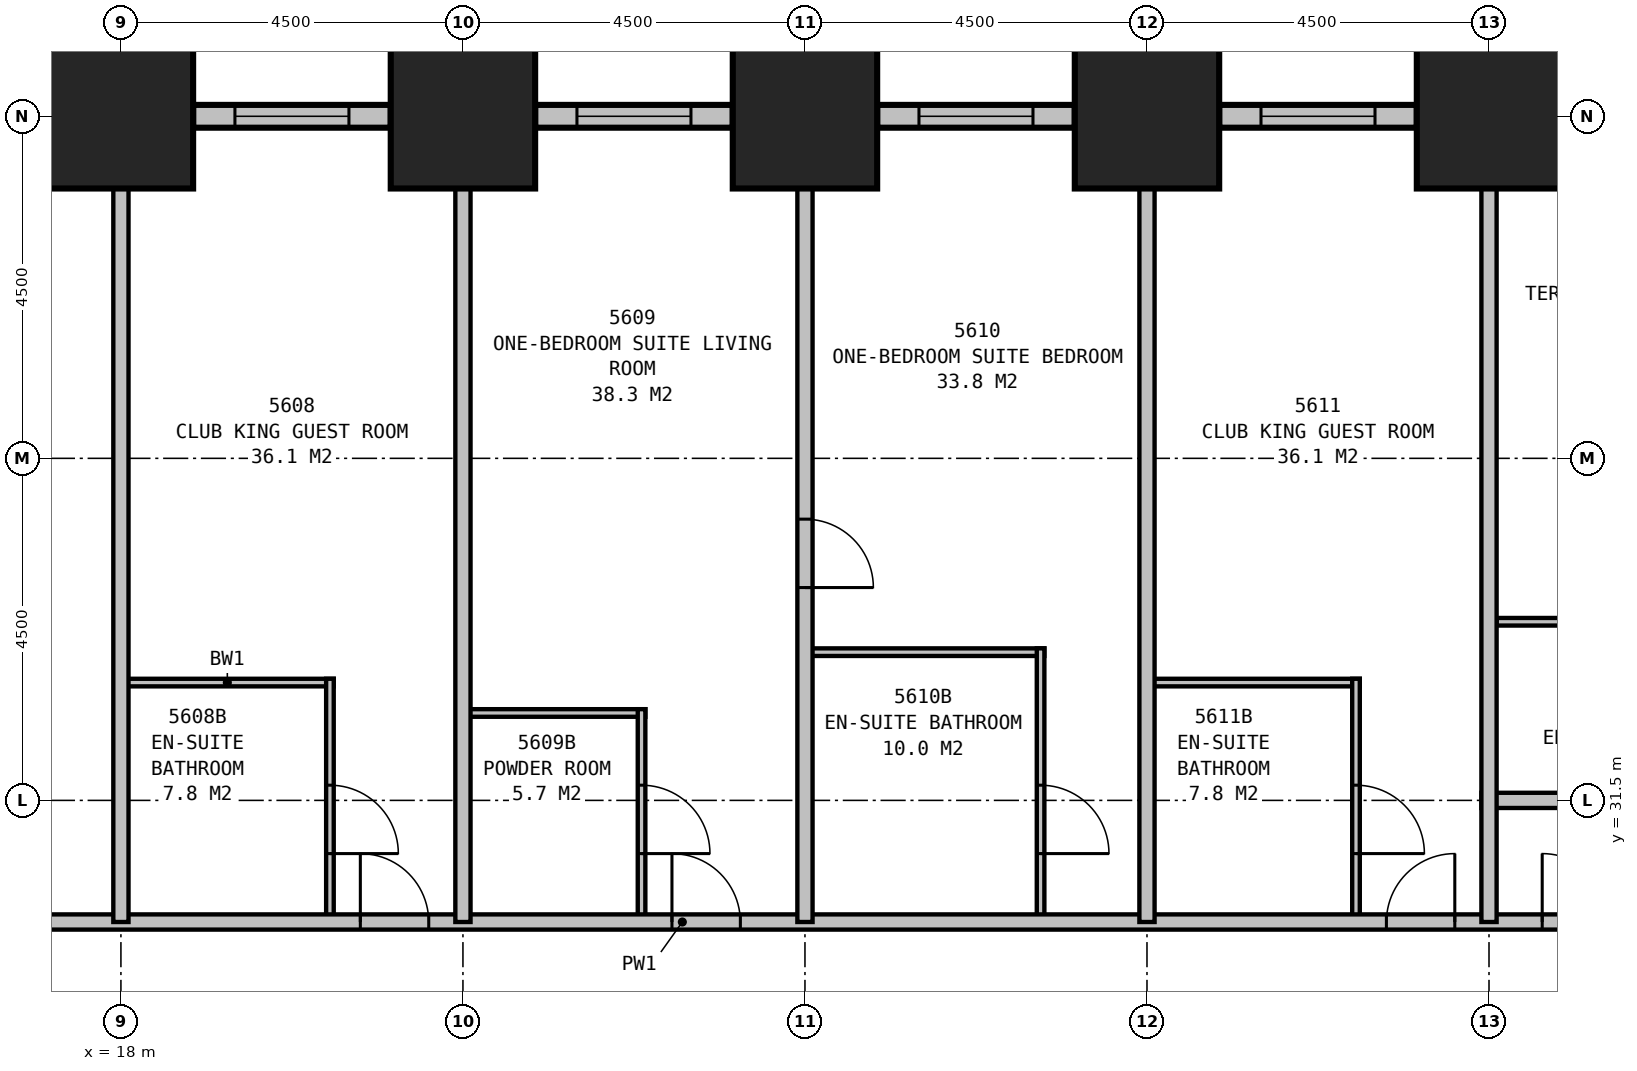
"""IFC4 building model, lengths in metres.
Left out: names, types, materials, properties, quantities, classifications, styles, units other than length and angle.
Written with IfcOpenShell. Run it as: python <this file> out.ifc"""

import sys

from ifc_helpers import new_model, si_unit, direction, frame, frame_2d, origin, origin_2d, place, context, subcontext, project, spatial, rectangle, extrude, element, fill, save


model = new_model("IFC4")
c1 = context("Model", 3, precision=1e-05, world=origin(), true_north=direction((0.0, 1.0)))
c2 = subcontext(c1, "Body", "Model", "MODEL_VIEW")
j1 = project(units=[si_unit("LENGTHUNIT", "METRE"), si_unit("PLANEANGLEUNIT", "RADIAN")], contexts=[c1])
p1 = place(None, origin())
s1 = spatial("IfcSite", under=j1, at=p1, CompositionType="ELEMENT")
p2 = place(p1, origin())
s2 = spatial("IfcBuilding", under=s1, at=p2, CompositionType="ELEMENT")
p3 = place(p2, frame((0.0, 0.0, 217.4)))
s3 = spatial("IfcBuildingStorey", under=s2, at=p3, CompositionType="ELEMENT", Elevation=217.4)
for number, where, z_axis, x_axis in (
    (1, (36.0, 40.5, 0.0), (0.0, 0.0, 1.0), (1.0, 0.0, 0.0)),
    (2, (31.5, 40.5, 0.0), (0.0, 0.0, 1.0), (1.0, 0.0, 0.0)),
    (3, (27.0, 40.5, 0.0), (0.0, 0.0, 1.0), (1.0, 0.0, 0.0)),
    (4, (22.5, 40.5, 0.0), (0.0, 0.0, 1.0), (1.0, 0.0, 0.0)),
    (5, (18.0, 40.5, 0.0), (0.0, 0.0, 1.0), (1.0, 0.0, 0.0)),
):
    element("IfcColumn", number, at=place(p3, frame(where, z_axis=z_axis, x_axis=x_axis)), inside=s3, PredefinedType="COLUMN", context=c2, shape_type="SweptSolid", body=[
        extrude(rectangle(XDim=1.9, YDim=1.9, at=origin_2d()), origin(), (0.0, 0.0, 1.0), 3.9),
    ])
p4 = place(p3, frame((35.05, 40.5, 0.0), z_axis=(0.0, 0.0, 1.0), x_axis=(-1.0, 0.0, 0.0)))
e6 = element("IfcWall", 6, at=p4, inside=s3, PredefinedType="STANDARD", context=c2, shape_type="SweptSolid", body=[
    extrude(rectangle(XDim=2.6, YDim=0.3, at=frame_2d((1.3, 0.0))), origin(), (0.0, 0.0, 1.0), 2.15),
])
p5 = place(p4, frame((0.55, 0.0, 0.5)))
e7 = element("IfcOpeningElement", 7, at=p5, cuts=e6, PredefinedType="OPENING", context=c2, shape_type="SweptSolid", body=[
    extrude(rectangle(XDim=1.5, YDim=1.5, at=frame_2d((0.75, 0.75))), frame((0.0, 0.16, 0.0), z_axis=(0.0, -1.0, 0.0), x_axis=(1.0, 0.0, 0.0)), (0.0, 0.0, 1.0), 0.32),
])
p6 = place(p3, frame((30.55, 40.5, 0.0), z_axis=(0.0, 0.0, 1.0), x_axis=(-1.0, 0.0, 0.0)))
e8 = element("IfcWall", 8, at=p6, inside=s3, PredefinedType="STANDARD", context=c2, shape_type="SweptSolid", body=[
    extrude(rectangle(XDim=2.6, YDim=0.3, at=frame_2d((1.3, 0.0))), origin(), (0.0, 0.0, 1.0), 2.15),
])
p7 = place(p6, frame((0.55, 0.0, 0.5)))
e9 = element("IfcOpeningElement", 9, at=p7, cuts=e8, PredefinedType="OPENING", context=c2, shape_type="SweptSolid", body=[
    extrude(rectangle(XDim=1.5, YDim=1.5, at=frame_2d((0.75, 0.75))), frame((0.0, 0.16, 0.0), z_axis=(0.0, -1.0, 0.0), x_axis=(1.0, 0.0, 0.0)), (0.0, 0.0, 1.0), 0.32),
])
p8 = place(p3, frame((26.05, 40.5, 0.0), z_axis=(0.0, 0.0, 1.0), x_axis=(-1.0, 0.0, 0.0)))
e10 = element("IfcWall", 10, at=p8, inside=s3, PredefinedType="STANDARD", context=c2, shape_type="SweptSolid", body=[
    extrude(rectangle(XDim=2.6, YDim=0.3, at=frame_2d((1.3, 0.0))), origin(), (0.0, 0.0, 1.0), 2.15),
])
p9 = place(p8, frame((0.55, 0.0, 0.5)))
e11 = element("IfcOpeningElement", 11, at=p9, cuts=e10, PredefinedType="OPENING", context=c2, shape_type="SweptSolid", body=[
    extrude(rectangle(XDim=1.5, YDim=1.5, at=frame_2d((0.75, 0.75))), frame((0.0, 0.16, 0.0), z_axis=(0.0, -1.0, 0.0), x_axis=(1.0, 0.0, 0.0)), (0.0, 0.0, 1.0), 0.32),
])
p10 = place(p3, frame((21.55, 40.5, 0.0), z_axis=(0.0, 0.0, 1.0), x_axis=(-1.0, 0.0, 0.0)))
e12 = element("IfcWall", 12, at=p10, inside=s3, PredefinedType="STANDARD", context=c2, shape_type="SweptSolid", body=[
    extrude(rectangle(XDim=2.6, YDim=0.3, at=frame_2d((1.3, 0.0))), origin(), (0.0, 0.0, 1.0), 2.15),
])
p11 = place(p10, frame((0.55, 0.0, 0.5)))
e13 = element("IfcOpeningElement", 13, at=p11, cuts=e12, PredefinedType="OPENING", context=c2, shape_type="SweptSolid", body=[
    extrude(rectangle(XDim=1.5, YDim=1.5, at=frame_2d((0.75, 0.75))), frame((0.0, 0.16, 0.0), z_axis=(0.0, -1.0, 0.0), x_axis=(1.0, 0.0, 0.0)), (0.0, 0.0, 1.0), 0.32),
])
p12 = place(p3, frame((12.473, 29.9, 0.0), z_axis=(0.0, 0.0, 1.0), x_axis=(1.0, 0.0, 0.0)))
e14 = element("IfcWall", 14, at=p12, inside=s3, PredefinedType="PARTITIONING", context=c2, shape_type="SweptSolid", body=[
    extrude(rectangle(XDim=25.827, YDim=0.2, at=frame_2d((12.914, 0.0))), origin(), (0.0, 0.0, 1.0), 3.65),
])
p13 = place(p12, frame((1.25, 0.0, 0.0)))
e15 = element("IfcOpeningElement", 15, at=p13, cuts=e14, PredefinedType="OPENING", context=c2, shape_type="SweptSolid", body=[
    extrude(rectangle(XDim=0.9, YDim=2.1, at=frame_2d((0.45, 1.05))), frame((0.0, 0.11, 0.0), z_axis=(0.0, -1.0, 0.0), x_axis=(1.0, 0.0, 0.0)), (0.0, 0.0, 1.0), 0.22),
])
p14 = place(p12, frame((8.677, 0.0, 0.0)))
e16 = element("IfcOpeningElement", 16, at=p14, cuts=e14, PredefinedType="OPENING", context=c2, shape_type="SweptSolid", body=[
    extrude(rectangle(XDim=0.9, YDim=2.1, at=frame_2d((0.45, 1.05))), frame((0.0, 0.11, 0.0), z_axis=(0.0, -1.0, 0.0), x_axis=(1.0, 0.0, 0.0)), (0.0, 0.0, 1.0), 0.22),
])
p15 = place(p12, frame((12.777, 0.0, 0.0)))
e17 = element("IfcOpeningElement", 17, at=p15, cuts=e14, PredefinedType="OPENING", context=c2, shape_type="SweptSolid", body=[
    extrude(rectangle(XDim=0.9, YDim=2.1, at=frame_2d((0.45, 1.05))), frame((0.0, 0.11, 0.0), z_axis=(0.0, -1.0, 0.0), x_axis=(1.0, 0.0, 0.0)), (0.0, 0.0, 1.0), 0.22),
])
p16 = place(p12, frame((22.177, 0.0, 0.0)))
e18 = element("IfcOpeningElement", 18, at=p16, cuts=e14, PredefinedType="OPENING", context=c2, shape_type="SweptSolid", body=[
    extrude(rectangle(XDim=0.9, YDim=2.1, at=frame_2d((0.45, 1.05))), frame((0.0, 0.11, 0.0), z_axis=(0.0, -1.0, 0.0), x_axis=(1.0, 0.0, 0.0)), (0.0, 0.0, 1.0), 0.22),
])
p17 = place(p12, frame((24.227, 0.0, 0.0)))
e19 = element("IfcOpeningElement", 19, at=p17, cuts=e14, PredefinedType="OPENING", context=c2, shape_type="SweptSolid", body=[
    extrude(rectangle(XDim=0.9, YDim=2.1, at=frame_2d((0.45, 1.05))), frame((0.0, 0.11, 0.0), z_axis=(0.0, -1.0, 0.0), x_axis=(1.0, 0.0, 0.0)), (0.0, 0.0, 1.0), 0.22),
])
for number, where, z_axis, x_axis in (
    (20, (18.0, 29.9, 0.0), (0.0, 0.0, 1.0), (0.0, 1.0, 0.0)),
    (21, (22.5, 29.9, 0.0), (0.0, 0.0, 1.0), (0.0, 1.0, 0.0)),
):
    element("IfcWall", number, at=place(p3, frame(where, z_axis=z_axis, x_axis=x_axis)), inside=s3, PredefinedType="PARTITIONING", context=c2, shape_type="SweptSolid", body=[
        extrude(rectangle(XDim=10.6, YDim=0.2, at=frame_2d((5.3, 0.0))), origin(), (0.0, 0.0, 1.0), 2.65),
    ])
p18 = place(p3, frame((27.0, 29.9, 0.0), z_axis=(0.0, 0.0, 1.0), x_axis=(0.0, 1.0, 0.0)))
e22 = element("IfcWall", 22, at=p18, inside=s3, PredefinedType="PARTITIONING", context=c2, shape_type="SweptSolid", body=[
    extrude(rectangle(XDim=10.6, YDim=0.2, at=frame_2d((5.3, 0.0))), origin(), (0.0, 0.0, 1.0), 2.65),
])
p19 = place(p18, frame((5.3, 0.0, 0.0), z_axis=(0.0, 0.0, 1.0), x_axis=(-1.0, 0.0, 0.0)))
e23 = element("IfcOpeningElement", 23, at=p19, cuts=e22, PredefinedType="OPENING", context=c2, shape_type="SweptSolid", body=[
    extrude(rectangle(XDim=0.9, YDim=2.1, at=frame_2d((0.45, 1.05))), frame((0.0, 0.11, 0.0), z_axis=(0.0, -1.0, 0.0), x_axis=(1.0, 0.0, 0.0)), (0.0, 0.0, 1.0), 0.22),
])
p20 = place(p3, frame((31.5, 29.9, 0.0), z_axis=(0.0, 0.0, 1.0), x_axis=(0.0, 1.0, 0.0)))
e24 = element("IfcWall", 24, at=p20, inside=s3, PredefinedType="PARTITIONING", context=c2, shape_type="SweptSolid", body=[
    extrude(rectangle(XDim=10.6, YDim=0.2, at=frame_2d((5.3, 0.0))), origin(), (0.0, 0.0, 1.0), 2.65),
])
p21 = place(p3, frame((18.0, 33.05, 0.0), z_axis=(0.0, 0.0, 1.0), x_axis=(1.0, 0.0, 0.0)))
e25 = element("IfcWall", 25, at=p21, inside=s3, PredefinedType="PLUMBINGWALL", context=c2, shape_type="SweptSolid", body=[
    extrude(rectangle(XDim=2.8, YDim=0.1, at=frame_2d((1.4, 0.0))), origin(), (0.0, 0.0, 1.0), 3.65),
])
p22 = place(p3, frame((20.75, 29.9, 0.0), z_axis=(0.0, 0.0, 1.0), x_axis=(0.0, 1.0, 0.0)))
e26 = element("IfcWall", 26, at=p22, inside=s3, PredefinedType="PLUMBINGWALL", context=c2, shape_type="SweptSolid", body=[
    extrude(rectangle(XDim=3.2, YDim=0.1, at=frame_2d((1.6, 0.0))), origin(), (0.0, 0.0, 1.0), 3.65),
])
p23 = place(p22, frame((1.8, 0.0, 0.0), z_axis=(0.0, 0.0, 1.0), x_axis=(-1.0, 0.0, 0.0)))
e27 = element("IfcOpeningElement", 27, at=p23, cuts=e26, PredefinedType="OPENING", context=c2, shape_type="SweptSolid", body=[
    extrude(rectangle(XDim=0.9, YDim=2.1, at=frame_2d((0.45, 1.05))), frame((0.0, 0.06, 0.0), z_axis=(0.0, -1.0, 0.0), x_axis=(1.0, 0.0, 0.0)), (0.0, 0.0, 1.0), 0.12),
])
p24 = place(p3, frame((22.5, 32.65, 0.0), z_axis=(0.0, 0.0, 1.0), x_axis=(1.0, 0.0, 0.0)))
e28 = element("IfcWall", 28, at=p24, inside=s3, PredefinedType="PLUMBINGWALL", context=c2, shape_type="SweptSolid", body=[
    extrude(rectangle(XDim=2.4, YDim=0.1, at=frame_2d((1.2, 0.0))), origin(), (0.0, 0.0, 1.0), 3.65),
])
p25 = place(p3, frame((24.85, 29.9, 0.0), z_axis=(0.0, 0.0, 1.0), x_axis=(0.0, 1.0, 0.0)))
e29 = element("IfcWall", 29, at=p25, inside=s3, PredefinedType="PLUMBINGWALL", context=c2, shape_type="SweptSolid", body=[
    extrude(rectangle(XDim=2.8, YDim=0.1, at=frame_2d((1.4, 0.0))), origin(), (0.0, 0.0, 1.0), 3.65),
])
p26 = place(p25, frame((1.8, 0.0, 0.0), z_axis=(0.0, 0.0, 1.0), x_axis=(-1.0, 0.0, 0.0)))
e30 = element("IfcOpeningElement", 30, at=p26, cuts=e29, PredefinedType="OPENING", context=c2, shape_type="SweptSolid", body=[
    extrude(rectangle(XDim=0.9, YDim=2.1, at=frame_2d((0.45, 1.05))), frame((0.0, 0.06, 0.0), z_axis=(0.0, -1.0, 0.0), x_axis=(1.0, 0.0, 0.0)), (0.0, 0.0, 1.0), 0.12),
])
p27 = place(p3, frame((27.0, 33.45, 0.0), z_axis=(0.0, 0.0, 1.0), x_axis=(1.0, 0.0, 0.0)))
e31 = element("IfcWall", 31, at=p27, inside=s3, PredefinedType="PLUMBINGWALL", context=c2, shape_type="SweptSolid", body=[
    extrude(rectangle(XDim=3.15, YDim=0.1, at=frame_2d((1.575, 0.0))), origin(), (0.0, 0.0, 1.0), 3.65),
])
p28 = place(p3, frame((30.1, 29.9, 0.0), z_axis=(0.0, 0.0, 1.0), x_axis=(0.0, 1.0, 0.0)))
e32 = element("IfcWall", 32, at=p28, inside=s3, PredefinedType="PLUMBINGWALL", context=c2, shape_type="SweptSolid", body=[
    extrude(rectangle(XDim=3.6, YDim=0.1, at=frame_2d((1.8, 0.0))), origin(), (0.0, 0.0, 1.0), 3.65),
])
p29 = place(p28, frame((1.8, 0.0, 0.0), z_axis=(0.0, 0.0, 1.0), x_axis=(-1.0, 0.0, 0.0)))
e33 = element("IfcOpeningElement", 33, at=p29, cuts=e32, PredefinedType="OPENING", context=c2, shape_type="SweptSolid", body=[
    extrude(rectangle(XDim=0.9, YDim=2.1, at=frame_2d((0.45, 1.05))), frame((0.0, 0.06, 0.0), z_axis=(0.0, -1.0, 0.0), x_axis=(1.0, 0.0, 0.0)), (0.0, 0.0, 1.0), 0.12),
])
p30 = place(p3, frame((31.5, 33.05, 0.0), z_axis=(0.0, 0.0, 1.0), x_axis=(1.0, 0.0, 0.0)))
e34 = element("IfcWall", 34, at=p30, inside=s3, PredefinedType="PLUMBINGWALL", context=c2, shape_type="SweptSolid", body=[
    extrude(rectangle(XDim=2.8, YDim=0.1, at=frame_2d((1.4, 0.0))), origin(), (0.0, 0.0, 1.0), 3.65),
])
p31 = place(p3, frame((34.25, 29.9, 0.0), z_axis=(0.0, 0.0, 1.0), x_axis=(0.0, 1.0, 0.0)))
e35 = element("IfcWall", 35, at=p31, inside=s3, PredefinedType="PLUMBINGWALL", context=c2, shape_type="SweptSolid", body=[
    extrude(rectangle(XDim=3.2, YDim=0.1, at=frame_2d((1.6, 0.0))), origin(), (0.0, 0.0, 1.0), 3.65),
])
p32 = place(p31, frame((1.8, 0.0, 0.0), z_axis=(0.0, 0.0, 1.0), x_axis=(-1.0, 0.0, 0.0)))
e36 = element("IfcOpeningElement", 36, at=p32, cuts=e35, PredefinedType="OPENING", context=c2, shape_type="SweptSolid", body=[
    extrude(rectangle(XDim=0.9, YDim=2.1, at=frame_2d((0.45, 1.05))), frame((0.0, 0.06, 0.0), z_axis=(0.0, -1.0, 0.0), x_axis=(1.0, 0.0, 0.0)), (0.0, 0.0, 1.0), 0.12),
])
p33 = place(p3, frame((36.0, 29.9, 0.0), z_axis=(0.0, 0.0, 1.0), x_axis=(0.0, 1.0, 0.0)))
e37 = element("IfcWall", 37, at=p33, inside=s3, PredefinedType="PARTITIONING", context=c2, shape_type="SweptSolid", body=[
    extrude(rectangle(XDim=10.6, YDim=0.2, at=frame_2d((5.3, 0.0))), origin(), (0.0, 0.0, 1.0), 2.65),
])
p34 = place(p3, frame((35.9, 31.5, 0.0), z_axis=(0.0, 0.0, 1.0), x_axis=(1.0, 0.0, 0.0)))
e38 = element("IfcWall", 38, at=p34, inside=s3, PredefinedType="PARTITIONING", context=c2, shape_type="SweptSolid", body=[
    extrude(rectangle(XDim=10.099, YDim=0.2, at=frame_2d((5.05, 0.0))), origin(), (0.0, 0.0, 1.0), 3.65),
])
p35 = place(p34, frame((8.099, 0.0, 0.0)))
e39 = element("IfcOpeningElement", 39, at=p35, cuts=e38, PredefinedType="OPENING", context=c2, shape_type="SweptSolid", body=[
    extrude(rectangle(XDim=0.9, YDim=2.1, at=frame_2d((0.45, 1.05))), frame((0.0, 0.11, 0.0), z_axis=(0.0, -1.0, 0.0), x_axis=(1.0, 0.0, 0.0)), (0.0, 0.0, 1.0), 0.22),
])
p36 = place(p3, frame((36.1, 33.85, 0.0), z_axis=(0.0, 0.0, 1.0), x_axis=(1.0, 0.0, 0.0)))
e40 = element("IfcWall", 40, at=p36, inside=s3, PredefinedType="PLUMBINGWALL", context=c2, shape_type="SweptSolid", body=[
    extrude(rectangle(XDim=3.5, YDim=0.1, at=frame_2d((1.75, 0.0))), origin(), (0.0, 0.0, 1.0), 3.65),
])
p37 = place(p36, frame((0.9, 0.0, 0.0)))
e41 = element("IfcOpeningElement", 41, at=p37, cuts=e40, PredefinedType="OPENING", context=c2, shape_type="SweptSolid", body=[
    extrude(rectangle(XDim=0.9, YDim=2.1, at=frame_2d((0.45, 1.05))), frame((0.0, 0.06, 0.0), z_axis=(0.0, -1.0, 0.0), x_axis=(1.0, 0.0, 0.0)), (0.0, 0.0, 1.0), 0.12),
])
p38 = place(p5, origin())
e42 = element("IfcWindow", 42, at=p38, inside=s3, PartitioningType="SINGLE_PANEL", PredefinedType="WINDOW", context=c2, shape_type="SweptSolid", body=[
    extrude(rectangle(XDim=1.5, YDim=1.5, at=frame_2d((0.75, 0.75))), frame((0.0, 0.03, 0.0), z_axis=(0.0, -1.0, 0.0), x_axis=(1.0, 0.0, 0.0)), (0.0, 0.0, 1.0), 0.06),
])
fill(e7, e42)
p39 = place(p7, origin())
e43 = element("IfcWindow", 43, at=p39, inside=s3, PartitioningType="SINGLE_PANEL", PredefinedType="WINDOW", context=c2, shape_type="SweptSolid", body=[
    extrude(rectangle(XDim=1.5, YDim=1.5, at=frame_2d((0.75, 0.75))), frame((0.0, 0.03, 0.0), z_axis=(0.0, -1.0, 0.0), x_axis=(1.0, 0.0, 0.0)), (0.0, 0.0, 1.0), 0.06),
])
fill(e9, e43)
p40 = place(p9, origin())
e44 = element("IfcWindow", 44, at=p40, inside=s3, PartitioningType="SINGLE_PANEL", PredefinedType="WINDOW", context=c2, shape_type="SweptSolid", body=[
    extrude(rectangle(XDim=1.5, YDim=1.5, at=frame_2d((0.75, 0.75))), frame((0.0, 0.03, 0.0), z_axis=(0.0, -1.0, 0.0), x_axis=(1.0, 0.0, 0.0)), (0.0, 0.0, 1.0), 0.06),
])
fill(e11, e44)
p41 = place(p11, origin())
e45 = element("IfcWindow", 45, at=p41, inside=s3, PartitioningType="SINGLE_PANEL", PredefinedType="WINDOW", context=c2, shape_type="SweptSolid", body=[
    extrude(rectangle(XDim=1.5, YDim=1.5, at=frame_2d((0.75, 0.75))), frame((0.0, 0.03, 0.0), z_axis=(0.0, -1.0, 0.0), x_axis=(1.0, 0.0, 0.0)), (0.0, 0.0, 1.0), 0.06),
])
fill(e13, e45)
p42 = place(p14, origin())
e46 = element("IfcDoor", 46, at=p42, inside=s3, OperationType="SINGLE_SWING_LEFT", PredefinedType="DOOR", context=c2, shape_type="SweptSolid", body=[
    extrude(rectangle(XDim=0.9, YDim=2.1, at=frame_2d((0.45, 1.05))), frame((0.0, 0.025, 0.0), z_axis=(0.0, -1.0, 0.0), x_axis=(1.0, 0.0, 0.0)), (0.0, 0.0, 1.0), 0.05),
])
fill(e16, e46)
p43 = place(p15, origin())
e47 = element("IfcDoor", 47, at=p43, inside=s3, OperationType="SINGLE_SWING_LEFT", PredefinedType="DOOR", context=c2, shape_type="SweptSolid", body=[
    extrude(rectangle(XDim=0.9, YDim=2.1, at=frame_2d((0.45, 1.05))), frame((0.0, 0.025, 0.0), z_axis=(0.0, -1.0, 0.0), x_axis=(1.0, 0.0, 0.0)), (0.0, 0.0, 1.0), 0.05),
])
fill(e17, e47)
p44 = place(p16, origin())
e48 = element("IfcDoor", 48, at=p44, inside=s3, OperationType="SINGLE_SWING_RIGHT", PredefinedType="DOOR", context=c2, shape_type="SweptSolid", body=[
    extrude(rectangle(XDim=0.9, YDim=2.1, at=frame_2d((0.45, 1.05))), frame((0.0, 0.025, 0.0), z_axis=(0.0, -1.0, 0.0), x_axis=(1.0, 0.0, 0.0)), (0.0, 0.0, 1.0), 0.05),
])
fill(e18, e48)
p45 = place(p17, origin())
e49 = element("IfcDoor", 49, at=p45, inside=s3, OperationType="SINGLE_SWING_LEFT", PredefinedType="DOOR", context=c2, shape_type="SweptSolid", body=[
    extrude(rectangle(XDim=0.9, YDim=2.1, at=frame_2d((0.45, 1.05))), frame((0.0, 0.025, 0.0), z_axis=(0.0, -1.0, 0.0), x_axis=(1.0, 0.0, 0.0)), (0.0, 0.0, 1.0), 0.05),
])
fill(e19, e49)
p46 = place(p19, origin())
e50 = element("IfcDoor", 50, at=p46, inside=s3, OperationType="SINGLE_SWING_RIGHT", PredefinedType="DOOR", context=c2, shape_type="SweptSolid", body=[
    extrude(rectangle(XDim=0.9, YDim=2.1, at=frame_2d((0.45, 1.05))), frame((0.0, 0.025, 0.0), z_axis=(0.0, -1.0, 0.0), x_axis=(1.0, 0.0, 0.0)), (0.0, 0.0, 1.0), 0.05),
])
fill(e23, e50)
p47 = place(p23, origin())
e51 = element("IfcDoor", 51, at=p47, inside=s3, OperationType="SINGLE_SWING_RIGHT", PredefinedType="DOOR", context=c2, shape_type="SweptSolid", body=[
    extrude(rectangle(XDim=0.9, YDim=2.1, at=frame_2d((0.45, 1.05))), frame((0.0, 0.025, 0.0), z_axis=(0.0, -1.0, 0.0), x_axis=(1.0, 0.0, 0.0)), (0.0, 0.0, 1.0), 0.05),
])
fill(e27, e51)
p48 = place(p26, origin())
e52 = element("IfcDoor", 52, at=p48, inside=s3, OperationType="SINGLE_SWING_RIGHT", PredefinedType="DOOR", context=c2, shape_type="SweptSolid", body=[
    extrude(rectangle(XDim=0.9, YDim=2.1, at=frame_2d((0.45, 1.05))), frame((0.0, 0.025, 0.0), z_axis=(0.0, -1.0, 0.0), x_axis=(1.0, 0.0, 0.0)), (0.0, 0.0, 1.0), 0.05),
])
fill(e30, e52)
p49 = place(p29, origin())
e53 = element("IfcDoor", 53, at=p49, inside=s3, OperationType="SINGLE_SWING_RIGHT", PredefinedType="DOOR", context=c2, shape_type="SweptSolid", body=[
    extrude(rectangle(XDim=0.9, YDim=2.1, at=frame_2d((0.45, 1.05))), frame((0.0, 0.025, 0.0), z_axis=(0.0, -1.0, 0.0), x_axis=(1.0, 0.0, 0.0)), (0.0, 0.0, 1.0), 0.05),
])
fill(e33, e53)
p50 = place(p32, origin())
e54 = element("IfcDoor", 54, at=p50, inside=s3, OperationType="SINGLE_SWING_RIGHT", PredefinedType="DOOR", context=c2, shape_type="SweptSolid", body=[
    extrude(rectangle(XDim=0.9, YDim=2.1, at=frame_2d((0.45, 1.05))), frame((0.0, 0.025, 0.0), z_axis=(0.0, -1.0, 0.0), x_axis=(1.0, 0.0, 0.0)), (0.0, 0.0, 1.0), 0.05),
])
fill(e36, e54)
save(model, sys.argv[1])
